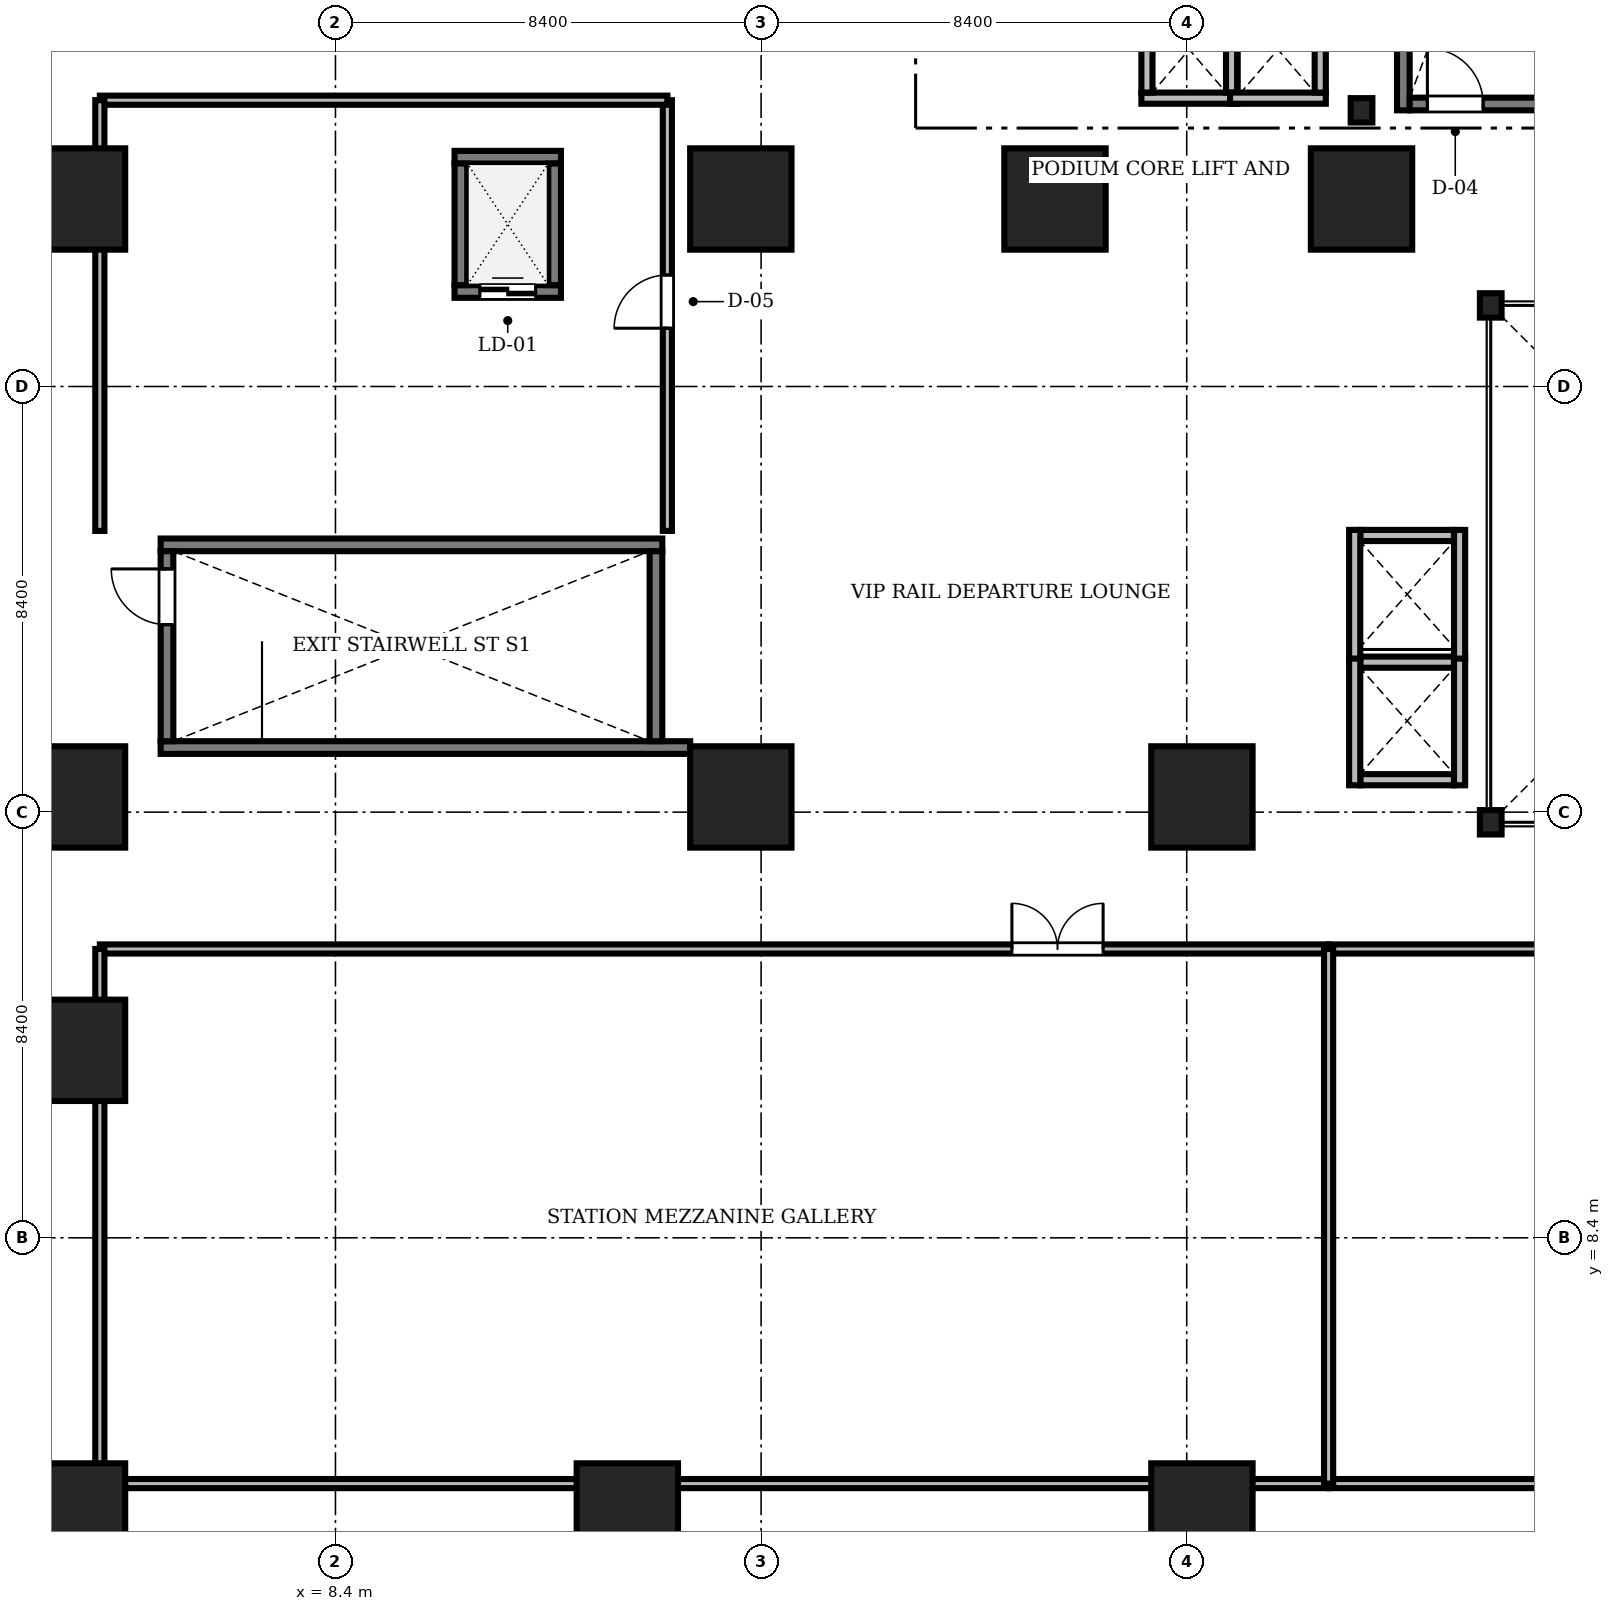
"""IFC4 building model, lengths in metres.
Left out: names, types, materials, properties, quantities, classifications, styles, units other than length and angle.
Written with IfcOpenShell. Run it as: python <this file> out.ifc"""

import sys

from ifc_helpers import new_model, si_unit, direction, frame, frame_2d, origin, origin_2d, place, context, subcontext, project, spatial, rectangle, i_section, extrude, source, transform, mapped, element, fill, save


model = new_model("IFC4")
c1 = context("Model", 3, precision=1e-05, world=origin(), true_north=direction((0.0, 1.0)))
c2 = subcontext(c1, "Body", "Model", "MODEL_VIEW")
j1 = project(units=[si_unit("LENGTHUNIT", "METRE"), si_unit("PLANEANGLEUNIT", "RADIAN")], contexts=[c1])
p1 = place(None, origin())
s1 = spatial("IfcSite", under=j1, at=p1, CompositionType="ELEMENT")
p2 = place(p1, origin())
s2 = spatial("IfcBuilding", under=s1, at=p2, CompositionType="ELEMENT")
p3 = place(p2, frame((0.0, 0.0, 6.0)))
s3 = spatial("IfcBuildingStorey", under=s2, at=p3, CompositionType="ELEMENT", Elevation=6.0)
m1 = source(origin(), c2, "Body", "SweptSolid", [
    extrude(i_section(OverallWidth=0.428, OverallDepth=0.481, WebThickness=0.04, FlangeThickness=0.063, FilletRadius=0.015, at=origin_2d()), origin(), (0.0, 0.0, 1.0), 5.0),
])
for number, where, z_axis, x_axis in (
    (1, (31.2, 16.6, 0.0), (0.0, 0.0, 1.0), (1.0, 0.0, 0.0)),
    (2, (31.2, 26.8, 0.0), (0.0, 0.0, 1.0), (1.0, 0.0, 0.0)),
    (3, (28.65, 30.65, 0.0), (0.0, 0.0, 1.0), (1.0, 0.0, 0.0)),
):
    element("IfcColumn", number, at=place(p3, frame(where, z_axis=z_axis, x_axis=x_axis)), inside=s3, PredefinedType="COLUMN", context=c2, shape_type="MappedRepresentation", body=[
        mapped(m1, transform((0.0, 0.0, 0.0), scale=1.0)),
    ])
m2 = source(origin(), c2, "Body", "SweptSolid", [
    extrude(rectangle(XDim=2.0, YDim=2.0, at=origin_2d()), origin(), (0.0, 0.0, 1.0), 5.0),
])
for number, where, z_axis, x_axis in (
    (4, (3.25, 2.95, 0.0), (0.0, 0.0, 1.0), (1.0, 0.0, 0.0)),
    (5, (14.16, 2.95, 0.0), (0.0, 0.0, 1.0), (1.0, 0.0, 0.0)),
    (6, (25.5, 2.95, 0.0), (0.0, 0.0, 1.0), (1.0, 0.0, 0.0)),
    (7, (3.25, 12.1, 0.0), (0.0, 0.0, 1.0), (1.0, 0.0, 0.0)),
    (8, (3.25, 17.1, 0.0), (0.0, 0.0, 1.0), (1.0, 0.0, 0.0)),
    (9, (16.4, 17.1, 0.0), (0.0, 0.0, 1.0), (1.0, 0.0, 0.0)),
    (10, (25.5, 17.1, 0.0), (0.0, 0.0, 1.0), (1.0, 0.0, 0.0)),
    (11, (3.25, 28.9, 0.0), (0.0, 0.0, 1.0), (1.0, 0.0, 0.0)),
    (12, (16.4, 28.9, 0.0), (0.0, 0.0, 1.0), (1.0, 0.0, 0.0)),
    (13, (22.6, 28.9, 0.0), (0.0, 0.0, 1.0), (1.0, 0.0, 0.0)),
    (14, (28.65, 28.9, 0.0), (0.0, 0.0, 1.0), (1.0, 0.0, 0.0)),
):
    element("IfcColumn", number, at=place(p3, frame(where, z_axis=z_axis, x_axis=x_axis)), inside=s3, PredefinedType="COLUMN", context=c2, shape_type="MappedRepresentation", body=[
        mapped(m2, transform((0.0, 0.0, 0.0), scale=1.0)),
    ])
m3 = source(origin(), c2, "Body", "SweptSolid", [
    extrude(rectangle(XDim=9.05, YDim=0.25, at=frame_2d((4.525, 0.0))), origin(), (0.0, 0.0, 1.0), 5.2),
])
p4 = place(p3, frame((29.475, 30.65, 0.0), z_axis=(0.0, 0.0, 1.0), x_axis=(0.0, 1.0, 0.0)))
e15 = element("IfcWall", 15, at=p4, inside=s3, PredefinedType="SOLIDWALL", context=c2, shape_type="MappedRepresentation", body=[
    mapped(m3, transform((0.0, 0.0, 0.0), scale=1.0)),
])
m4 = source(origin(), c2, "Body", "SweptSolid", [
    extrude(rectangle(XDim=3.15, YDim=0.25, at=frame_2d((1.575, 0.0))), origin(), (0.0, 0.0, 1.0), 5.2),
])
p5 = place(p3, frame((29.6, 30.775, 0.0), z_axis=(0.0, 0.0, 1.0), x_axis=(1.0, 0.0, 0.0)))
e16 = element("IfcWall", 16, at=p5, inside=s3, PredefinedType="SOLIDWALL", context=c2, shape_type="MappedRepresentation", body=[
    mapped(m4, transform((0.0, 0.0, 0.0), scale=1.0)),
])
m5 = source(origin(), c2, "Body", "SweptSolid", [
    extrude(rectangle(XDim=1.1, YDim=2.2, at=frame_2d((0.55, 1.1))), frame((0.0, 0.135, 0.0), z_axis=(0.0, -1.0, 0.0), x_axis=(1.0, 0.0, 0.0)), (0.0, 0.0, 1.0), 0.27),
])
p6 = place(p5, frame((0.35, 0.0, 0.0)))
e17 = element("IfcOpeningElement", 17, at=p6, cuts=e16, PredefinedType="OPENING", context=c2, shape_type="MappedRepresentation", body=[
    mapped(m5, transform((0.0, 0.0, 0.0), scale=1.0)),
])
m6 = source(origin(), c2, "Body", "SweptSolid", [
    extrude(rectangle(XDim=10.45, YDim=0.25, at=frame_2d((5.225, 0.0))), origin(), (0.0, 0.0, 1.0), 5.0),
])
p7 = place(p3, frame((4.95, 18.075, 0.0), z_axis=(0.0, 0.0, 1.0), x_axis=(1.0, 0.0, 0.0)))
e18 = element("IfcWall", 18, at=p7, inside=s3, PredefinedType="SOLIDWALL", context=c2, shape_type="MappedRepresentation", body=[
    mapped(m6, transform((0.0, 0.0, 0.0), scale=1.0)),
])
m7 = source(origin(), c2, "Body", "SweptSolid", [
    extrude(rectangle(XDim=9.9, YDim=0.25, at=frame_2d((4.95, 0.0))), origin(), (0.0, 0.0, 1.0), 5.0),
])
p8 = place(p3, frame((4.95, 22.075, 0.0), z_axis=(0.0, 0.0, 1.0), x_axis=(1.0, 0.0, 0.0)))
e19 = element("IfcWall", 19, at=p8, inside=s3, PredefinedType="SOLIDWALL", context=c2, shape_type="MappedRepresentation", body=[
    mapped(m7, transform((0.0, 0.0, 0.0), scale=1.0)),
])
m8 = source(origin(), c2, "Body", "SweptSolid", [
    extrude(rectangle(XDim=3.75, YDim=0.25, at=frame_2d((1.875, 0.0))), origin(), (0.0, 0.0, 1.0), 5.0),
])
p9 = place(p3, frame((14.725, 18.2, 0.0), z_axis=(0.0, 0.0, 1.0), x_axis=(0.0, 1.0, 0.0)))
e20 = element("IfcWall", 20, at=p9, inside=s3, PredefinedType="SOLIDWALL", context=c2, shape_type="MappedRepresentation", body=[
    mapped(m8, transform((0.0, 0.0, 0.0), scale=1.0)),
])
p10 = place(p3, frame((5.075, 18.2, 0.0), z_axis=(0.0, 0.0, 1.0), x_axis=(0.0, 1.0, 0.0)))
e21 = element("IfcWall", 21, at=p10, inside=s3, PredefinedType="SOLIDWALL", context=c2, shape_type="MappedRepresentation", body=[
    mapped(m8, transform((0.0, 0.0, 0.0), scale=1.0)),
])
p11 = place(p10, frame((2.3, 0.0, 0.0)))
e22 = element("IfcOpeningElement", 22, at=p11, cuts=e21, PredefinedType="OPENING", context=c2, shape_type="MappedRepresentation", body=[
    mapped(m5, transform((0.0, 0.0, 0.0), scale=1.0)),
])
m9 = source(origin(), c2, "Body", "SweptSolid", [
    extrude(rectangle(XDim=2.1, YDim=0.25, at=frame_2d((1.05, 0.0))), origin(), (0.0, 0.0, 1.0), 5.0),
])
p12 = place(p3, frame((10.75, 27.075, 0.0), z_axis=(0.0, 0.0, 1.0), x_axis=(1.0, 0.0, 0.0)))
e23 = element("IfcWall", 23, at=p12, inside=s3, PredefinedType="SOLIDWALL", context=c2, shape_type="MappedRepresentation", body=[
    mapped(m9, transform((0.0, 0.0, 0.0), scale=1.0)),
])
p13 = place(p12, frame((0.5, 0.0, 0.0)))
e24 = element("IfcOpeningElement", 24, at=p13, cuts=e23, PredefinedType="OPENING", context=c2, shape_type="MappedRepresentation", body=[
    mapped(m5, transform((0.0, 0.0, 0.0), scale=1.0)),
])
p14 = place(p3, frame((10.75, 29.725, 0.0), z_axis=(0.0, 0.0, 1.0), x_axis=(1.0, 0.0, 0.0)))
e25 = element("IfcWall", 25, at=p14, inside=s3, PredefinedType="SOLIDWALL", context=c2, shape_type="MappedRepresentation", body=[
    mapped(m9, transform((0.0, 0.0, 0.0), scale=1.0)),
])
m10 = source(origin(), c2, "Body", "SweptSolid", [
    extrude(rectangle(XDim=2.4, YDim=0.25, at=frame_2d((1.2, 0.0))), origin(), (0.0, 0.0, 1.0), 5.0),
])
for number, where, z_axis, x_axis in (
    (26, (10.875, 27.2, 0.0), (0.0, 0.0, 1.0), (0.0, 1.0, 0.0)),
    (27, (12.725, 27.2, 0.0), (0.0, 0.0, 1.0), (0.0, 1.0, 0.0)),
):
    element("IfcWall", number, at=place(p3, frame(where, z_axis=z_axis, x_axis=x_axis)), inside=s3, PredefinedType="SOLIDWALL", context=c2, shape_type="MappedRepresentation", body=[
        mapped(m10, transform((0.0, 0.0, 0.0), scale=1.0)),
    ])
m11 = source(origin(), c2, "Body", "SweptSolid", [
    extrude(rectangle(XDim=1.89, YDim=0.22, at=frame_2d((0.945, 0.0))), origin(), (0.0, 0.0, 1.0), 5.0),
])
p15 = place(p3, frame((24.305, 30.89, 0.0), z_axis=(0.0, 0.0, 1.0), x_axis=(1.0, 0.0, 0.0)))
e28 = element("IfcWall", 28, at=p15, inside=s3, PredefinedType="SOLIDWALL", context=c2, shape_type="MappedRepresentation", body=[
    mapped(m11, transform((0.0, 0.0, 0.0), scale=1.0)),
])
m12 = source(origin(), c2, "Body", "SweptSolid", [
    extrude(rectangle(XDim=1.7, YDim=0.22, at=frame_2d((0.85, 0.0))), origin(), (0.0, 0.0, 1.0), 5.0),
])
for number, where, z_axis, x_axis in (
    (29, (24.415, 31.0, 0.0), (0.0, 0.0, 1.0), (0.0, 1.0, 0.0)),
    (30, (26.085, 31.0, 0.0), (0.0, 0.0, 1.0), (0.0, 1.0, 0.0)),
):
    element("IfcWall", number, at=place(p3, frame(where, z_axis=z_axis, x_axis=x_axis)), inside=s3, PredefinedType="SOLIDWALL", context=c2, shape_type="MappedRepresentation", body=[
        mapped(m12, transform((0.0, 0.0, 0.0), scale=1.0)),
    ])
p16 = place(p3, frame((26.055, 30.89, 0.0), z_axis=(0.0, 0.0, 1.0), x_axis=(1.0, 0.0, 0.0)))
e31 = element("IfcWall", 31, at=p16, inside=s3, PredefinedType="SOLIDWALL", context=c2, shape_type="MappedRepresentation", body=[
    mapped(m11, transform((0.0, 0.0, 0.0), scale=1.0)),
])
p17 = place(p3, frame((27.835, 31.0, 0.0), z_axis=(0.0, 0.0, 1.0), x_axis=(0.0, 1.0, 0.0)))
e32 = element("IfcWall", 32, at=p17, inside=s3, PredefinedType="SOLIDWALL", context=c2, shape_type="MappedRepresentation", body=[
    mapped(m12, transform((0.0, 0.0, 0.0), scale=1.0)),
])
m13 = source(origin(), c2, "Body", "SweptSolid", [
    extrude(rectangle(XDim=1.85, YDim=0.22, at=frame_2d((0.925, 0.0))), origin(), (0.0, 0.0, 1.0), 5.0),
])
for number, where, z_axis, x_axis in (
    (33, (28.625, 17.44, 0.0), (0.0, 0.0, 1.0), (1.0, 0.0, 0.0)),
    (34, (28.625, 19.76, 0.0), (0.0, 0.0, 1.0), (1.0, 0.0, 0.0)),
):
    element("IfcWall", number, at=place(p3, frame(where, z_axis=z_axis, x_axis=x_axis)), inside=s3, PredefinedType="SOLIDWALL", context=c2, shape_type="MappedRepresentation", body=[
        mapped(m13, transform((0.0, 0.0, 0.0), scale=1.0)),
    ])
m14 = source(origin(), c2, "Body", "SweptSolid", [
    extrude(rectangle(XDim=2.54, YDim=0.22, at=frame_2d((1.27, 0.0))), origin(), (0.0, 0.0, 1.0), 5.0),
])
for number, where, z_axis, x_axis in (
    (35, (28.515, 17.33, 0.0), (0.0, 0.0, 1.0), (0.0, 1.0, 0.0)),
    (36, (30.585, 17.33, 0.0), (0.0, 0.0, 1.0), (0.0, 1.0, 0.0)),
):
    element("IfcWall", number, at=place(p3, frame(where, z_axis=z_axis, x_axis=x_axis)), inside=s3, PredefinedType="SOLIDWALL", context=c2, shape_type="MappedRepresentation", body=[
        mapped(m14, transform((0.0, 0.0, 0.0), scale=1.0)),
    ])
p18 = place(p3, frame((28.625, 22.26, 0.0), z_axis=(0.0, 0.0, 1.0), x_axis=(1.0, 0.0, 0.0)))
e37 = element("IfcWall", 37, at=p18, inside=s3, PredefinedType="SOLIDWALL", context=c2, shape_type="MappedRepresentation", body=[
    mapped(m13, transform((0.0, 0.0, 0.0), scale=1.0)),
])
for number, where, z_axis, x_axis in (
    (38, (28.515, 19.83, 0.0), (0.0, 0.0, 1.0), (0.0, 1.0, 0.0)),
    (39, (30.585, 19.83, 0.0), (0.0, 0.0, 1.0), (0.0, 1.0, 0.0)),
):
    element("IfcWall", number, at=place(p3, frame(where, z_axis=z_axis, x_axis=x_axis)), inside=s3, PredefinedType="SOLIDWALL", context=c2, shape_type="MappedRepresentation", body=[
        mapped(m14, transform((0.0, 0.0, 0.0), scale=1.0)),
    ])
m15 = source(origin(), c2, "Body", "SweptSolid", [
    extrude(rectangle(XDim=36.25, YDim=0.18, at=frame_2d((18.125, 0.0))), origin(), (0.0, 0.0, 1.0), 4.392),
])
p19 = place(p3, frame((28.0, 14.1, 0.0), z_axis=(0.0, 0.0, 1.0), x_axis=(1.0, 0.0, 0.0)))
e40 = element("IfcWall", 40, at=p19, inside=s3, PredefinedType="PARTITIONING", context=c2, shape_type="MappedRepresentation", body=[
    mapped(m15, transform((0.0, 0.0, 0.0), scale=1.0)),
])
m16 = source(origin(), c2, "Body", "SweptSolid", [
    extrude(rectangle(XDim=1.8, YDim=2.4, at=frame_2d((0.9, 1.2))), frame((0.0, 0.1, 0.0), z_axis=(0.0, -1.0, 0.0), x_axis=(1.0, 0.0, 0.0)), (0.0, 0.0, 1.0), 0.2),
])
p20 = place(p19, frame((16.0, 0.0, 0.0)))
e41 = element("IfcOpeningElement", 41, at=p20, cuts=e40, PredefinedType="OPENING", context=c2, shape_type="MappedRepresentation", body=[
    mapped(m16, transform((0.0, 0.0, 0.0), scale=1.0)),
])
m17 = source(origin(), c2, "Body", "SweptSolid", [
    extrude(rectangle(XDim=24.25, YDim=0.18, at=frame_2d((12.125, 0.0))), origin(), (0.0, 0.0, 1.0), 4.392),
])
p21 = place(p3, frame((3.75, 14.1, 0.0), z_axis=(0.0, 0.0, 1.0), x_axis=(1.0, 0.0, 0.0)))
e42 = element("IfcWall", 42, at=p21, inside=s3, PredefinedType="PARTITIONING", context=c2, shape_type="MappedRepresentation", body=[
    mapped(m17, transform((0.0, 0.0, 0.0), scale=1.0)),
])
p22 = place(p21, frame((18.0, 0.0, 0.0)))
e43 = element("IfcOpeningElement", 43, at=p22, cuts=e42, PredefinedType="OPENING", context=c2, shape_type="MappedRepresentation", body=[
    mapped(m16, transform((0.0, 0.0, 0.0), scale=1.0)),
])
m18 = source(origin(), c2, "Body", "SweptSolid", [
    extrude(rectangle(XDim=8.5, YDim=0.18, at=frame_2d((4.25, 0.0))), origin(), (0.0, 0.0, 1.0), 5.0),
])
p23 = place(p3, frame((14.95, 22.35, 0.0), z_axis=(0.0, 0.0, 1.0), x_axis=(0.0, 1.0, 0.0)))
e44 = element("IfcWall", 44, at=p23, inside=s3, PredefinedType="PARTITIONING", context=c2, shape_type="MappedRepresentation", body=[
    mapped(m18, transform((0.0, 0.0, 0.0), scale=1.0)),
])
m19 = source(origin(), c2, "Body", "SweptSolid", [
    extrude(rectangle(XDim=1.05, YDim=2.2, at=frame_2d((0.525, 1.1))), frame((0.0, 0.1, 0.0), z_axis=(0.0, -1.0, 0.0), x_axis=(1.0, 0.0, 0.0)), (0.0, 0.0, 1.0), 0.2),
])
p24 = place(p23, frame((4.0, 0.0, 0.0)))
e45 = element("IfcOpeningElement", 45, at=p24, cuts=e44, PredefinedType="OPENING", context=c2, shape_type="MappedRepresentation", body=[
    mapped(m19, transform((0.0, 0.0, 0.0), scale=1.0)),
])
p25 = place(p3, frame((28.0, 3.55, 0.0), z_axis=(0.0, 0.0, 1.0), x_axis=(1.0, 0.0, 0.0)))
e46 = element("IfcWall", 46, at=p25, inside=s3, PredefinedType="PARTITIONING", context=c2, shape_type="MappedRepresentation", body=[
    mapped(m15, transform((0.0, 0.0, 0.0), scale=1.0)),
])
p26 = place(p3, frame((3.75, 3.55, 0.0), z_axis=(0.0, 0.0, 1.0), x_axis=(1.0, 0.0, 0.0)))
e47 = element("IfcWall", 47, at=p26, inside=s3, PredefinedType="PARTITIONING", context=c2, shape_type="MappedRepresentation", body=[
    mapped(m17, transform((0.0, 0.0, 0.0), scale=1.0)),
])
m20 = source(origin(), c2, "Body", "SweptSolid", [
    extrude(rectangle(XDim=11.2, YDim=0.18, at=frame_2d((5.6, 0.0))), origin(), (0.0, 0.0, 1.0), 5.0),
])
p27 = place(p3, frame((3.75, 30.85, 0.0), z_axis=(0.0, 0.0, 1.0), x_axis=(1.0, 0.0, 0.0)))
e48 = element("IfcWall", 48, at=p27, inside=s3, PredefinedType="PARTITIONING", context=c2, shape_type="MappedRepresentation", body=[
    mapped(m20, transform((0.0, 0.0, 0.0), scale=1.0)),
])
m21 = source(origin(), c2, "Body", "SweptSolid", [
    extrude(rectangle(XDim=10.55, YDim=0.18, at=frame_2d((5.275, 0.0))), origin(), (0.0, 0.0, 1.0), 4.592),
])
p28 = place(p3, frame((3.75, 3.55, 0.0), z_axis=(0.0, 0.0, 1.0), x_axis=(0.0, 1.0, 0.0)))
e49 = element("IfcWall", 49, at=p28, inside=s3, PredefinedType="PARTITIONING", context=c2, shape_type="MappedRepresentation", body=[
    mapped(m21, transform((0.0, 0.0, 0.0), scale=1.0)),
])
m22 = source(origin(), c2, "Body", "SweptSolid", [
    extrude(rectangle(XDim=10.55, YDim=0.18, at=frame_2d((5.275, 0.0))), origin(), (0.0, 0.0, 1.0), 5.0),
])
p29 = place(p3, frame((28.0, 3.55, 0.0), z_axis=(0.0, 0.0, 1.0), x_axis=(0.0, 1.0, 0.0)))
e50 = element("IfcWall", 50, at=p29, inside=s3, PredefinedType="PARTITIONING", context=c2, shape_type="MappedRepresentation", body=[
    mapped(m22, transform((0.0, 0.0, 0.0), scale=1.0)),
])
p30 = place(p3, frame((3.75, 22.35, 0.0), z_axis=(0.0, 0.0, 1.0), x_axis=(0.0, 1.0, 0.0)))
e51 = element("IfcWall", 51, at=p30, inside=s3, PredefinedType="PARTITIONING", context=c2, shape_type="MappedRepresentation", body=[
    mapped(m18, transform((0.0, 0.0, 0.0), scale=1.0)),
])
m23 = source(origin(), c2, "Body", "SweptSolid", [
    extrude(rectangle(XDim=1.1, YDim=2.2, at=frame_2d((0.55, 1.1))), frame((0.0, 0.025, 0.0), z_axis=(0.0, -1.0, 0.0), x_axis=(1.0, 0.0, 0.0)), (0.0, 0.0, 1.0), 0.05),
])
p31 = place(p6, origin())
e52 = element("IfcDoor", 52, at=p31, inside=s3, OperationType="SINGLE_SWING_LEFT", PredefinedType="DOOR", context=c2, shape_type="MappedRepresentation", body=[
    mapped(m23, transform((0.0, 0.0, 0.0), scale=1.0)),
])
fill(e17, e52)
p32 = place(p11, origin())
e53 = element("IfcDoor", 53, at=p32, inside=s3, OperationType="SINGLE_SWING_RIGHT", PredefinedType="DOOR", context=c2, shape_type="MappedRepresentation", body=[
    mapped(m23, transform((0.0, 0.0, 0.0), scale=1.0)),
])
fill(e22, e53)
p33 = place(p13, origin())
e54 = element("IfcDoor", 54, at=p33, inside=s3, OperationType="DOUBLE_DOOR_SLIDING", PredefinedType="DOOR", context=c2, shape_type="MappedRepresentation", body=[
    mapped(m23, transform((0.0, 0.0, 0.0), scale=1.0)),
])
fill(e24, e54)
m24 = source(origin(), c2, "Body", "SweptSolid", [
    extrude(rectangle(XDim=1.8, YDim=2.4, at=frame_2d((0.9, 1.2))), frame((0.0, 0.025, 0.0), z_axis=(0.0, -1.0, 0.0), x_axis=(1.0, 0.0, 0.0)), (0.0, 0.0, 1.0), 0.05),
])
p34 = place(p22, origin())
e55 = element("IfcDoor", 55, at=p34, inside=s3, OperationType="DOUBLE_DOOR_SINGLE_SWING", PredefinedType="DOOR", context=c2, shape_type="MappedRepresentation", body=[
    mapped(m24, transform((0.0, 0.0, 0.0), scale=1.0)),
])
fill(e43, e55)
m25 = source(origin(), c2, "Body", "SweptSolid", [
    extrude(rectangle(XDim=1.05, YDim=2.2, at=frame_2d((0.525, 1.1))), frame((0.0, 0.025, 0.0), z_axis=(0.0, -1.0, 0.0), x_axis=(1.0, 0.0, 0.0)), (0.0, 0.0, 1.0), 0.05),
])
p35 = place(p24, origin())
e56 = element("IfcDoor", 56, at=p35, inside=s3, OperationType="SINGLE_SWING_LEFT", PredefinedType="DOOR", context=c2, shape_type="MappedRepresentation", body=[
    mapped(m25, transform((0.0, 0.0, 0.0), scale=1.0)),
])
fill(e45, e56)
save(model, sys.argv[1])
